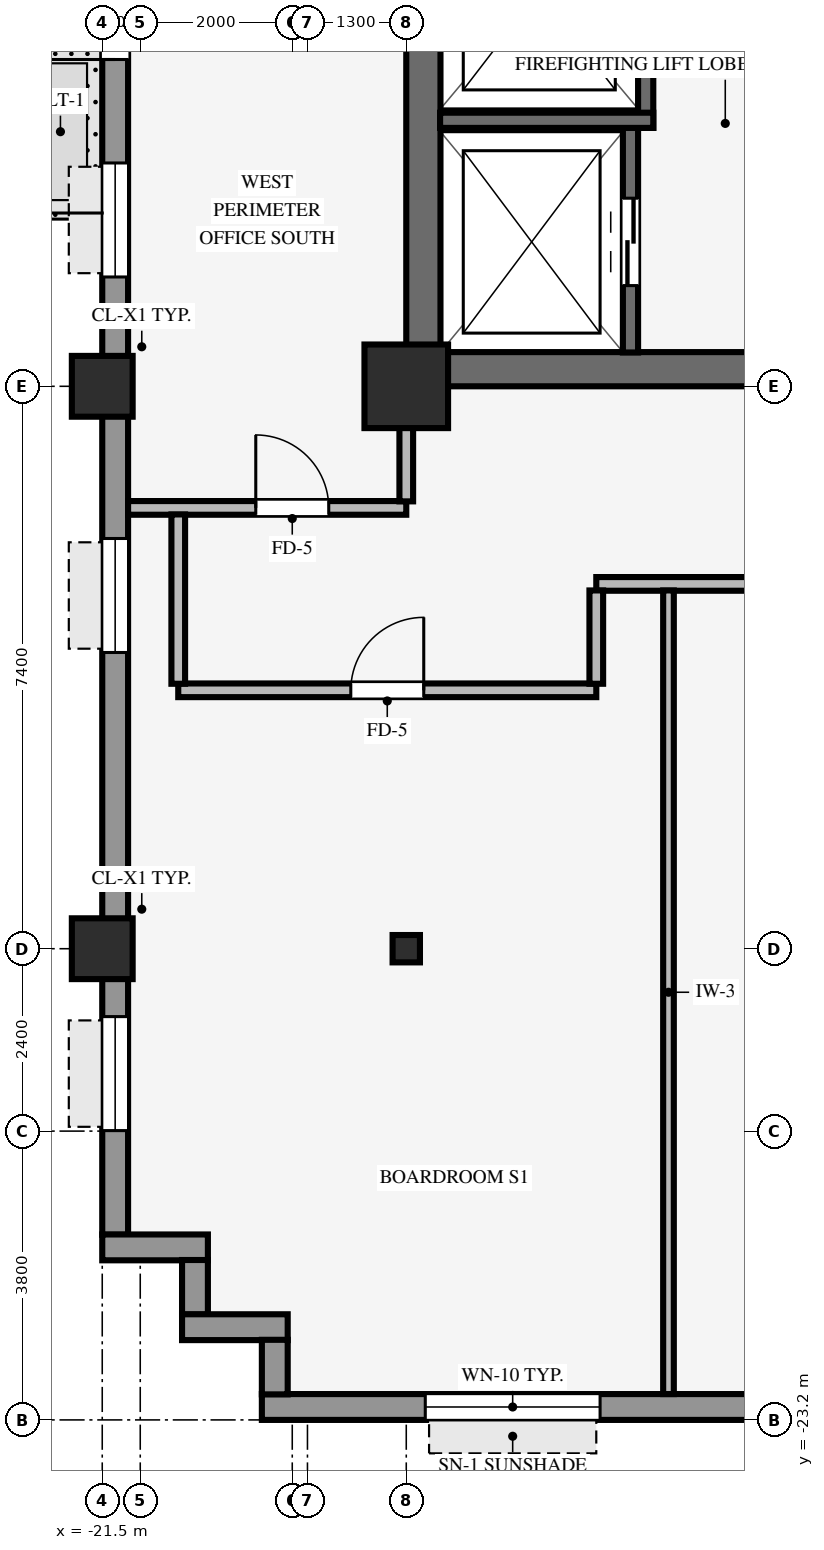
"""IFC4 building model, lengths in metres.
Left out: names, types, materials, properties, quantities, classifications, styles, units other than length and angle.
Written with IfcOpenShell. Run it as: python <this file> out.ifc"""

import sys

from ifc_helpers import new_model, si_unit, direction, frame, frame_2d, origin, origin_2d, place, context, subcontext, project, spatial, rectangle, hollow_rectangle, i_section, extrude, source, transform, mapped, element, fill, save


model = new_model("IFC4")
c1 = context("Model", 3, precision=1e-05, world=origin(), true_north=direction((0.0, 1.0)))
c2 = subcontext(c1, "Body", "Model", "MODEL_VIEW")
j1 = project(units=[si_unit("LENGTHUNIT", "METRE"), si_unit("PLANEANGLEUNIT", "RADIAN")], contexts=[c1])
p1 = place(None, origin())
s1 = spatial("IfcSite", under=j1, at=p1, CompositionType="ELEMENT")
p2 = place(p1, origin())
s2 = spatial("IfcBuilding", under=s1, at=p2, CompositionType="ELEMENT")
p3 = place(p2, frame((0.0, 0.0, 71.4)))
s3 = spatial("IfcBuildingStorey", under=s2, at=p3, CompositionType="ELEMENT", Elevation=71.4)
p4 = place(p3, frame((-17.5, -9.375, 0.0), z_axis=(0.0, 0.0, 1.0), x_axis=(1.0, 0.0, 0.0)))
e1 = element("IfcWall", 1, at=p4, inside=s3, PredefinedType="SHEAR", context=c2, shape_type="SweptSolid", body=[
    extrude(rectangle(XDim=8.5, YDim=0.45, at=frame_2d((4.25, 0.0))), origin(), (0.0, 0.0, 1.0), 3.37),
])
p5 = place(p3, frame((-17.275, -9.155, 0.0), z_axis=(0.0, 0.0, 1.0), x_axis=(0.0, 1.0, 0.0)))
e2 = element("IfcWall", 2, at=p5, inside=s3, PredefinedType="SHEAR", context=c2, shape_type="SweptSolid", body=[
    extrude(rectangle(XDim=18.31, YDim=0.45, at=frame_2d((9.155, 0.0))), origin(), (0.0, 0.0, 1.0), 3.37),
])
p6 = place(p3, frame((-17.5, -9.6, 0.0), z_axis=(0.0, 0.0, 1.0), x_axis=(1.0, 0.0, 0.0)))
e3 = element("IfcColumn", 3, at=p6, inside=s3, PredefinedType="COLUMN", context=c2, shape_type="SweptSolid", body=[
    extrude(rectangle(XDim=1.1, YDim=1.1, at=origin_2d()), origin(), (0.0, 0.0, 1.0), 3.37),
])
for number, where, z_axis, x_axis in (
    (4, (-21.5, -17.0, 0.0), (0.0, 0.0, 1.0), (1.0, 0.0, 0.0)),
    (5, (-21.5, -9.6, 0.0), (0.0, 0.0, 1.0), (1.0, 0.0, 0.0)),
):
    element("IfcColumn", number, at=place(p3, frame(where, z_axis=z_axis, x_axis=x_axis)), inside=s3, PredefinedType="COLUMN", context=c2, shape_type="SweptSolid", body=[
        extrude(hollow_rectangle(XDim=0.8, YDim=0.8, WallThickness=0.055, InnerFilletRadius=0.055, OuterFilletRadius=0.11, at=origin_2d()), origin(), (0.0, 0.0, 1.0), 3.37),
    ])
p7 = place(p3, frame((-17.5, -17.0, 0.0), z_axis=(0.0, 0.0, 1.0), x_axis=(1.0, 0.0, 0.0)))
e6 = element("IfcColumn", 6, at=p7, inside=s3, PredefinedType="COLUMN", context=c2, shape_type="SweptSolid", body=[
    extrude(i_section(OverallWidth=0.36, OverallDepth=0.36, WebThickness=0.021, FlangeThickness=0.021, FilletRadius=0.018, at=origin_2d()), origin(), (0.0, 0.0, 1.0), 3.37),
])
p8 = place(p3, frame((-19.4, -23.03, 0.0), z_axis=(0.0, 0.0, 1.0), x_axis=(1.0, 0.0, 0.0)))
e7 = element("IfcWall", 7, at=p8, inside=s3, PredefinedType="STANDARD", context=c2, shape_type="SweptSolid", body=[
    extrude(rectangle(XDim=38.8, YDim=0.34, at=frame_2d((19.4, 0.0))), origin(), (0.0, 0.0, 1.0), 2.705),
])
p9 = place(p8, frame((2.15, 0.0, 0.8)))
e8 = element("IfcOpeningElement", 8, at=p9, cuts=e7, PredefinedType="OPENING", context=c2, shape_type="SweptSolid", body=[
    extrude(rectangle(XDim=2.3, YDim=1.62, at=frame_2d((1.15, 0.81))), frame((0.0, 0.18, 0.0), z_axis=(0.0, -1.0, 0.0), x_axis=(1.0, 0.0, 0.0)), (0.0, 0.0, 1.0), 0.36),
])
p10 = place(p8, frame((6.75, 0.0, 0.8)))
e9 = element("IfcOpeningElement", 9, at=p10, cuts=e7, PredefinedType="OPENING", context=c2, shape_type="SweptSolid", body=[
    extrude(rectangle(XDim=2.3, YDim=1.62, at=frame_2d((1.15, 0.81))), frame((0.0, 0.18, 0.0), z_axis=(0.0, -1.0, 0.0), x_axis=(1.0, 0.0, 0.0)), (0.0, 0.0, 1.0), 0.36),
])
p11 = place(p8, frame((11.35, 0.0, 0.8)))
e10 = element("IfcOpeningElement", 10, at=p11, cuts=e7, PredefinedType="OPENING", context=c2, shape_type="SweptSolid", body=[
    extrude(rectangle(XDim=2.3, YDim=1.62, at=frame_2d((1.15, 0.81))), frame((0.0, 0.18, 0.0), z_axis=(0.0, -1.0, 0.0), x_axis=(1.0, 0.0, 0.0)), (0.0, 0.0, 1.0), 0.36),
])
p12 = place(p8, frame((15.95, 0.0, 0.8)))
e11 = element("IfcOpeningElement", 11, at=p12, cuts=e7, PredefinedType="OPENING", context=c2, shape_type="SweptSolid", body=[
    extrude(rectangle(XDim=2.3, YDim=1.62, at=frame_2d((1.15, 0.81))), frame((0.0, 0.18, 0.0), z_axis=(0.0, -1.0, 0.0), x_axis=(1.0, 0.0, 0.0)), (0.0, 0.0, 1.0), 0.36),
])
p13 = place(p8, frame((20.55, 0.0, 0.8)))
e12 = element("IfcOpeningElement", 12, at=p13, cuts=e7, PredefinedType="OPENING", context=c2, shape_type="SweptSolid", body=[
    extrude(rectangle(XDim=2.3, YDim=1.62, at=frame_2d((1.15, 0.81))), frame((0.0, 0.18, 0.0), z_axis=(0.0, -1.0, 0.0), x_axis=(1.0, 0.0, 0.0)), (0.0, 0.0, 1.0), 0.36),
])
p14 = place(p8, frame((25.15, 0.0, 0.8)))
e13 = element("IfcOpeningElement", 13, at=p14, cuts=e7, PredefinedType="OPENING", context=c2, shape_type="SweptSolid", body=[
    extrude(rectangle(XDim=2.3, YDim=1.62, at=frame_2d((1.15, 0.81))), frame((0.0, 0.18, 0.0), z_axis=(0.0, -1.0, 0.0), x_axis=(1.0, 0.0, 0.0)), (0.0, 0.0, 1.0), 0.36),
])
p15 = place(p8, frame((33.45, 0.0, 0.8)))
e14 = element("IfcOpeningElement", 14, at=p15, cuts=e7, PredefinedType="OPENING", context=c2, shape_type="SweptSolid", body=[
    extrude(rectangle(XDim=2.3, YDim=1.62, at=frame_2d((1.15, 0.81))), frame((0.0, 0.18, 0.0), z_axis=(0.0, -1.0, 0.0), x_axis=(1.0, 0.0, 0.0)), (0.0, 0.0, 1.0), 0.36),
])
p16 = place(p3, frame((-21.33, -20.764, 0.0), z_axis=(0.0, 0.0, 1.0), x_axis=(0.0, 1.0, 0.0)))
e15 = element("IfcWall", 15, at=p16, inside=s3, PredefinedType="STANDARD", context=c2, shape_type="SweptSolid", body=[
    extrude(rectangle(XDim=41.528, YDim=0.34, at=frame_2d((20.764, 0.0))), origin(), (0.0, 0.0, 1.0), 2.705),
])
p17 = place(p16, frame((15.464, 0.0, 0.0)))
e16 = element("IfcOpeningElement", 16, at=p17, cuts=e15, PredefinedType="OPENING", context=c2, shape_type="SweptSolid", body=[
    extrude(rectangle(XDim=0.98, YDim=2.15, at=frame_2d((0.49, 1.075))), frame((0.0, 0.18, 0.0), z_axis=(0.0, -1.0, 0.0), x_axis=(1.0, 0.0, 0.0)), (0.0, 0.0, 1.0), 0.36),
])
p18 = place(p16, frame((1.371, 0.0, 0.8)))
e17 = element("IfcOpeningElement", 17, at=p18, cuts=e15, PredefinedType="OPENING", context=c2, shape_type="SweptSolid", body=[
    extrude(rectangle(XDim=1.5, YDim=1.6, at=frame_2d((0.75, 0.8))), frame((0.0, 0.18, 0.0), z_axis=(0.0, -1.0, 0.0), x_axis=(1.0, 0.0, 0.0)), (0.0, 0.0, 1.0), 0.36),
])
p19 = place(p16, frame((7.662, 0.0, 0.8)))
e18 = element("IfcOpeningElement", 18, at=p19, cuts=e15, PredefinedType="OPENING", context=c2, shape_type="SweptSolid", body=[
    extrude(rectangle(XDim=1.5, YDim=1.6, at=frame_2d((0.75, 0.8))), frame((0.0, 0.18, 0.0), z_axis=(0.0, -1.0, 0.0), x_axis=(1.0, 0.0, 0.0)), (0.0, 0.0, 1.0), 0.36),
])
p20 = place(p16, frame((12.603, 0.0, 0.8)))
e19 = element("IfcOpeningElement", 19, at=p20, cuts=e15, PredefinedType="OPENING", context=c2, shape_type="SweptSolid", body=[
    extrude(rectangle(XDim=1.5, YDim=1.6, at=frame_2d((0.75, 0.8))), frame((0.0, 0.18, 0.0), z_axis=(0.0, -1.0, 0.0), x_axis=(1.0, 0.0, 0.0)), (0.0, 0.0, 1.0), 0.36),
])
p21 = place(p16, frame((22.485, 0.0, 0.8)))
e20 = element("IfcOpeningElement", 20, at=p21, cuts=e15, PredefinedType="OPENING", context=c2, shape_type="SweptSolid", body=[
    extrude(rectangle(XDim=1.5, YDim=1.6, at=frame_2d((0.75, 0.8))), frame((0.0, 0.18, 0.0), z_axis=(0.0, -1.0, 0.0), x_axis=(1.0, 0.0, 0.0)), (0.0, 0.0, 1.0), 0.36),
])
p22 = place(p16, frame((27.426, 0.0, 0.8)))
e21 = element("IfcOpeningElement", 21, at=p22, cuts=e15, PredefinedType="OPENING", context=c2, shape_type="SweptSolid", body=[
    extrude(rectangle(XDim=1.5, YDim=1.6, at=frame_2d((0.75, 0.8))), frame((0.0, 0.18, 0.0), z_axis=(0.0, -1.0, 0.0), x_axis=(1.0, 0.0, 0.0)), (0.0, 0.0, 1.0), 0.36),
])
p23 = place(p16, frame((32.366, 0.0, 0.8)))
e22 = element("IfcOpeningElement", 22, at=p23, cuts=e15, PredefinedType="OPENING", context=c2, shape_type="SweptSolid", body=[
    extrude(rectangle(XDim=1.5, YDim=1.6, at=frame_2d((0.75, 0.8))), frame((0.0, 0.18, 0.0), z_axis=(0.0, -1.0, 0.0), x_axis=(1.0, 0.0, 0.0)), (0.0, 0.0, 1.0), 0.36),
])
p24 = place(p16, frame((38.657, 0.0, 0.8)))
e23 = element("IfcOpeningElement", 23, at=p24, cuts=e15, PredefinedType="OPENING", context=c2, shape_type="SweptSolid", body=[
    extrude(rectangle(XDim=1.5, YDim=1.6, at=frame_2d((0.75, 0.8))), frame((0.0, 0.18, 0.0), z_axis=(0.0, -1.0, 0.0), x_axis=(1.0, 0.0, 0.0)), (0.0, 0.0, 1.0), 0.36),
])
p25 = place(p3, frame((-21.5, -20.93, 0.0), z_axis=(0.0, 0.0, 1.0), x_axis=(1.0, 0.0, 0.0)))
e24 = element("IfcWall", 24, at=p25, inside=s3, PredefinedType="STANDARD", context=c2, shape_type="SweptSolid", body=[
    extrude(rectangle(XDim=1.39, YDim=0.34, at=frame_2d((0.695, 0.0))), origin(), (0.0, 0.0, 1.0), 3.36),
])
p26 = place(p3, frame((-20.28, -21.814, 0.0), z_axis=(0.0, 0.0, 1.0), x_axis=(0.0, 1.0, 0.0)))
e25 = element("IfcWall", 25, at=p26, inside=s3, PredefinedType="STANDARD", context=c2, shape_type="SweptSolid", body=[
    extrude(rectangle(XDim=0.718, YDim=0.34, at=frame_2d((0.359, 0.0))), origin(), (0.0, 0.0, 1.0), 3.36),
])
p27 = place(p3, frame((-20.45, -21.98, 0.0), z_axis=(0.0, 0.0, 1.0), x_axis=(1.0, 0.0, 0.0)))
e26 = element("IfcWall", 26, at=p27, inside=s3, PredefinedType="STANDARD", context=c2, shape_type="SweptSolid", body=[
    extrude(rectangle(XDim=1.39, YDim=0.34, at=frame_2d((0.695, 0.0))), origin(), (0.0, 0.0, 1.0), 3.36),
])
p28 = place(p3, frame((-19.23, -22.864, 0.0), z_axis=(0.0, 0.0, 1.0), x_axis=(0.0, 1.0, 0.0)))
e27 = element("IfcWall", 27, at=p28, inside=s3, PredefinedType="STANDARD", context=c2, shape_type="SweptSolid", body=[
    extrude(rectangle(XDim=0.718, YDim=0.34, at=frame_2d((0.359, 0.0))), origin(), (0.0, 0.0, 1.0), 3.36),
])
p29 = place(p3, frame((-14.55, -9.155, 0.0), z_axis=(0.0, 0.0, 1.0), x_axis=(0.0, 1.0, 0.0)))
e28 = element("IfcWall", 28, at=p29, inside=s3, PredefinedType="SHEAR", context=c2, shape_type="SweptSolid", body=[
    extrude(rectangle(XDim=2.96, YDim=0.2, at=frame_2d((1.48, 0.0))), origin(), (0.0, 0.0, 1.0), 3.37),
])
p30 = place(p29, frame((0.88, 0.0, 0.0)))
e29 = element("IfcOpeningElement", 29, at=p30, cuts=e28, PredefinedType="OPENING", context=c2, shape_type="SweptSolid", body=[
    extrude(rectangle(XDim=1.15, YDim=2.15, at=frame_2d((0.575, 1.075))), frame((0.0, 0.11, 0.0), z_axis=(0.0, -1.0, 0.0), x_axis=(1.0, 0.0, 0.0)), (0.0, 0.0, 1.0), 0.22),
])
p31 = place(p3, frame((-14.35, -6.2, 0.0), z_axis=(0.0, 0.0, 1.0), x_axis=(0.0, 1.0, 0.0)))
e30 = element("IfcWall", 30, at=p31, inside=s3, PredefinedType="SHEAR", context=c2, shape_type="SweptSolid", body=[
    extrude(rectangle(XDim=7.105, YDim=0.2, at=frame_2d((3.552, 0.0))), origin(), (0.0, 0.0, 1.0), 3.37),
])
p32 = place(p31, frame((5.69, 0.0, 0.0), z_axis=(0.0, 0.0, 1.0), x_axis=(-1.0, 0.0, 0.0)))
e31 = element("IfcOpeningElement", 31, at=p32, cuts=e30, PredefinedType="OPENING", context=c2, shape_type="SweptSolid", body=[
    extrude(rectangle(XDim=0.88, YDim=2.1, at=frame_2d((0.44, 1.05))), frame((0.0, 0.11, 0.0), z_axis=(0.0, -1.0, 0.0), x_axis=(1.0, 0.0, 0.0)), (0.0, 0.0, 1.0), 0.22),
])
p33 = place(p31, frame((1.15, 0.0, 0.0)))
e32 = element("IfcOpeningElement", 32, at=p33, cuts=e30, PredefinedType="OPENING", context=c2, shape_type="SweptSolid", body=[
    extrude(rectangle(XDim=1.3, YDim=2.2, at=frame_2d((0.65, 1.1))), frame((0.0, 0.11, 0.0), z_axis=(0.0, -1.0, 0.0), x_axis=(1.0, 0.0, 0.0)), (0.0, 0.0, 1.0), 0.22),
])
p34 = place(p3, frame((-17.055, -6.1, 0.0), z_axis=(0.0, 0.0, 1.0), x_axis=(1.0, 0.0, 0.0)))
e33 = element("IfcWall", 33, at=p34, inside=s3, PredefinedType="SHEAR", context=c2, shape_type="SweptSolid", body=[
    extrude(rectangle(XDim=2.805, YDim=0.2, at=frame_2d((1.402, 0.0))), origin(), (0.0, 0.0, 1.0), 3.37),
])
p35 = place(p3, frame((-20.5, -13.6, 0.0), z_axis=(0.0, 0.0, 1.0), x_axis=(1.0, 0.0, 0.0)))
e34 = element("IfcWall", 34, at=p35, inside=s3, PredefinedType="PARTITIONING", context=c2, shape_type="SweptSolid", body=[
    extrude(rectangle(XDim=5.5, YDim=0.18, at=frame_2d((2.75, 0.0))), origin(), (0.0, 0.0, 1.0), 2.942),
])
p36 = place(p35, frame((2.27, 0.0, 0.0)))
e35 = element("IfcOpeningElement", 35, at=p36, cuts=e34, PredefinedType="OPENING", context=c2, shape_type="SweptSolid", body=[
    extrude(rectangle(XDim=0.96, YDim=2.1, at=frame_2d((0.48, 1.05))), frame((0.0, 0.1, 0.0), z_axis=(0.0, -1.0, 0.0), x_axis=(1.0, 0.0, 0.0)), (0.0, 0.0, 1.0), 0.2),
])
p37 = place(p3, frame((-15.0, -12.2, 0.0), z_axis=(0.0, 0.0, 1.0), x_axis=(1.0, 0.0, 0.0)))
e36 = element("IfcWall", 36, at=p37, inside=s3, PredefinedType="PARTITIONING", context=c2, shape_type="SweptSolid", body=[
    extrude(rectangle(XDim=30.0, YDim=0.18, at=frame_2d((15.0, 0.0))), origin(), (0.0, 0.0, 1.0), 3.36),
])
p38 = place(p37, frame((23.31, 0.0, 0.0)))
e37 = element("IfcOpeningElement", 37, at=p38, cuts=e36, PredefinedType="OPENING", context=c2, shape_type="SweptSolid", body=[
    extrude(rectangle(XDim=0.96, YDim=2.1, at=frame_2d((0.48, 1.05))), frame((0.0, 0.1, 0.0), z_axis=(0.0, -1.0, 0.0), x_axis=(1.0, 0.0, 0.0)), (0.0, 0.0, 1.0), 0.2),
])
p39 = place(p37, frame((16.73, 0.0, 0.0)))
e38 = element("IfcOpeningElement", 38, at=p39, cuts=e36, PredefinedType="OPENING", context=c2, shape_type="SweptSolid", body=[
    extrude(rectangle(XDim=0.96, YDim=2.1, at=frame_2d((0.48, 1.05))), frame((0.0, 0.1, 0.0), z_axis=(0.0, -1.0, 0.0), x_axis=(1.0, 0.0, 0.0)), (0.0, 0.0, 1.0), 0.2),
])
p40 = place(p37, frame((7.095, 0.0, 0.0)))
e39 = element("IfcOpeningElement", 39, at=p40, cuts=e36, PredefinedType="OPENING", context=c2, shape_type="SweptSolid", body=[
    extrude(rectangle(XDim=0.96, YDim=2.1, at=frame_2d((0.48, 1.05))), frame((0.0, 0.1, 0.0), z_axis=(0.0, -1.0, 0.0), x_axis=(1.0, 0.0, 0.0)), (0.0, 0.0, 1.0), 0.2),
])
p41 = place(p37, frame((2.645, 0.0, 0.0)))
e40 = element("IfcOpeningElement", 40, at=p41, cuts=e36, PredefinedType="OPENING", context=c2, shape_type="SweptSolid", body=[
    extrude(rectangle(XDim=0.96, YDim=2.1, at=frame_2d((0.48, 1.05))), frame((0.0, 0.1, 0.0), z_axis=(0.0, -1.0, 0.0), x_axis=(1.0, 0.0, 0.0)), (0.0, 0.0, 1.0), 0.2),
])
p42 = place(p37, frame((28.2, 0.0, 0.0)))
e41 = element("IfcOpeningElement", 41, at=p42, cuts=e36, PredefinedType="OPENING", context=c2, shape_type="SweptSolid", body=[
    extrude(rectangle(XDim=0.96, YDim=2.1, at=frame_2d((0.48, 1.05))), frame((0.0, 0.1, 0.0), z_axis=(0.0, -1.0, 0.0), x_axis=(1.0, 0.0, 0.0)), (0.0, 0.0, 1.0), 0.2),
])
p43 = place(p37, frame((12.52, 0.0, 0.0)))
e42 = element("IfcOpeningElement", 42, at=p43, cuts=e36, PredefinedType="OPENING", context=c2, shape_type="SweptSolid", body=[
    extrude(rectangle(XDim=0.96, YDim=2.1, at=frame_2d((0.48, 1.05))), frame((0.0, 0.1, 0.0), z_axis=(0.0, -1.0, 0.0), x_axis=(1.0, 0.0, 0.0)), (0.0, 0.0, 1.0), 0.2),
])
p44 = place(p3, frame((-21.16, -11.2, 0.0), z_axis=(0.0, 0.0, 1.0), x_axis=(1.0, 0.0, 0.0)))
e43 = element("IfcWall", 43, at=p44, inside=s3, PredefinedType="PARTITIONING", context=c2, shape_type="SweptSolid", body=[
    extrude(rectangle(XDim=3.66, YDim=0.18, at=frame_2d((1.83, 0.0))), origin(), (0.0, 0.0, 1.0), 3.36),
])
p45 = place(p44, frame((1.68, 0.0, 0.0)))
e44 = element("IfcOpeningElement", 44, at=p45, cuts=e43, PredefinedType="OPENING", context=c2, shape_type="SweptSolid", body=[
    extrude(rectangle(XDim=0.96, YDim=2.1, at=frame_2d((0.48, 1.05))), frame((0.0, 0.1, 0.0), z_axis=(0.0, -1.0, 0.0), x_axis=(1.0, 0.0, 0.0)), (0.0, 0.0, 1.0), 0.2),
])
p46 = place(p3, frame((-20.5, -13.514, 0.0), z_axis=(0.0, 0.0, 1.0), x_axis=(0.0, 1.0, 0.0)))
e45 = element("IfcWall", 45, at=p46, inside=s3, PredefinedType="PARTITIONING", context=c2, shape_type="SweptSolid", body=[
    extrude(rectangle(XDim=2.228, YDim=0.18, at=frame_2d((1.114, 0.0))), origin(), (0.0, 0.0, 1.0), 3.36),
])
p47 = place(p3, frame((-17.5, -11.114, 0.0), z_axis=(0.0, 0.0, 1.0), x_axis=(0.0, 1.0, 0.0)))
e46 = element("IfcWall", 46, at=p47, inside=s3, PredefinedType="PARTITIONING", context=c2, shape_type="SweptSolid", body=[
    extrude(rectangle(XDim=0.968, YDim=0.18, at=frame_2d((0.484, 0.0))), origin(), (0.0, 0.0, 1.0), 2.738),
])
p48 = place(p3, frame((-15.0, -13.514, 0.0), z_axis=(0.0, 0.0, 1.0), x_axis=(0.0, 1.0, 0.0)))
e47 = element("IfcWall", 47, at=p48, inside=s3, PredefinedType="PARTITIONING", context=c2, shape_type="SweptSolid", body=[
    extrude(rectangle(XDim=1.228, YDim=0.18, at=frame_2d((0.614, 0.0))), origin(), (0.0, 0.0, 1.0), 3.36),
])
p49 = place(p3, frame((-14.05, -22.86, 0.0), z_axis=(0.0, 0.0, 1.0), x_axis=(0.0, 1.0, 0.0)))
e48 = element("IfcWall", 48, at=p49, inside=s3, PredefinedType="PARTITIONING", context=c2, shape_type="SweptSolid", body=[
    extrude(rectangle(XDim=10.574, YDim=0.14, at=frame_2d((5.287, 0.0))), origin(), (0.0, 0.0, 1.0), 3.36),
])
m1 = source(origin(), c2, "Body", "SweptSolid", [
    extrude(rectangle(XDim=2.3, YDim=1.62, at=frame_2d((1.15, 0.81))), frame((0.0, 0.03, 0.0), z_axis=(0.0, -1.0, 0.0), x_axis=(1.0, 0.0, 0.0)), (0.0, 0.0, 1.0), 0.06),
])
p50 = place(p9, origin())
e49 = element("IfcWindow", 49, at=p50, inside=s3, PartitioningType="SINGLE_PANEL", PredefinedType="WINDOW", context=c2, shape_type="MappedRepresentation", body=[
    mapped(m1, transform((0.0, 0.0, 0.0), scale=1.0)),
])
fill(e8, e49)
m2 = source(origin(), c2, "Body", "SweptSolid", [
    extrude(rectangle(XDim=0.98, YDim=2.15, at=frame_2d((0.49, 1.075))), frame((0.0, 0.025, 0.0), z_axis=(0.0, -1.0, 0.0), x_axis=(1.0, 0.0, 0.0)), (0.0, 0.0, 1.0), 0.05),
])
p51 = place(p17, origin())
e50 = element("IfcDoor", 50, at=p51, inside=s3, OperationType="SINGLE_SWING_LEFT", PredefinedType="DOOR", context=c2, shape_type="MappedRepresentation", body=[
    mapped(m2, transform((0.0, 0.0, 0.0), scale=1.0)),
])
fill(e16, e50)
m3 = source(origin(), c2, "Body", "SweptSolid", [
    extrude(rectangle(XDim=1.5, YDim=1.6, at=frame_2d((0.75, 0.8))), frame((0.0, 0.03, 0.0), z_axis=(0.0, -1.0, 0.0), x_axis=(1.0, 0.0, 0.0)), (0.0, 0.0, 1.0), 0.06),
])
p52 = place(p18, origin())
e51 = element("IfcWindow", 51, at=p52, inside=s3, PartitioningType="SINGLE_PANEL", PredefinedType="WINDOW", context=c2, shape_type="MappedRepresentation", body=[
    mapped(m3, transform((0.0, 0.0, 0.0), scale=1.0)),
])
fill(e17, e51)
p53 = place(p19, origin())
e52 = element("IfcWindow", 52, at=p53, inside=s3, PartitioningType="SINGLE_PANEL", PredefinedType="WINDOW", context=c2, shape_type="MappedRepresentation", body=[
    mapped(m3, transform((0.0, 0.0, 0.0), scale=1.0)),
])
fill(e18, e52)
p54 = place(p20, origin())
e53 = element("IfcWindow", 53, at=p54, inside=s3, PartitioningType="SINGLE_PANEL", PredefinedType="WINDOW", context=c2, shape_type="MappedRepresentation", body=[
    mapped(m3, transform((0.0, 0.0, 0.0), scale=1.0)),
])
fill(e19, e53)
m4 = source(origin(), c2, "Body", "SweptSolid", [
    extrude(rectangle(XDim=1.15, YDim=2.15, at=frame_2d((0.575, 1.075))), frame((0.0, 0.025, 0.0), z_axis=(0.0, -1.0, 0.0), x_axis=(1.0, 0.0, 0.0)), (0.0, 0.0, 1.0), 0.05),
])
p55 = place(p30, origin())
e54 = element("IfcDoor", 54, at=p55, inside=s3, OperationType="DOUBLE_DOOR_SLIDING", PredefinedType="DOOR", context=c2, shape_type="MappedRepresentation", body=[
    mapped(m4, transform((0.0, 0.0, 0.0), scale=1.0)),
])
fill(e29, e54)
m5 = source(origin(), c2, "Body", "SweptSolid", [
    extrude(rectangle(XDim=0.96, YDim=2.1, at=frame_2d((0.48, 1.05))), frame((0.0, 0.025, 0.0), z_axis=(0.0, -1.0, 0.0), x_axis=(1.0, 0.0, 0.0)), (0.0, 0.0, 1.0), 0.05),
])
p56 = place(p36, origin())
e55 = element("IfcDoor", 55, at=p56, inside=s3, OperationType="SINGLE_SWING_RIGHT", PredefinedType="DOOR", context=c2, shape_type="MappedRepresentation", body=[
    mapped(m5, transform((0.0, 0.0, 0.0), scale=1.0)),
])
fill(e35, e55)
p57 = place(p45, origin())
e56 = element("IfcDoor", 56, at=p57, inside=s3, OperationType="SINGLE_SWING_LEFT", PredefinedType="DOOR", context=c2, shape_type="MappedRepresentation", body=[
    mapped(m5, transform((0.0, 0.0, 0.0), scale=1.0)),
])
fill(e44, e56)
save(model, sys.argv[1])
